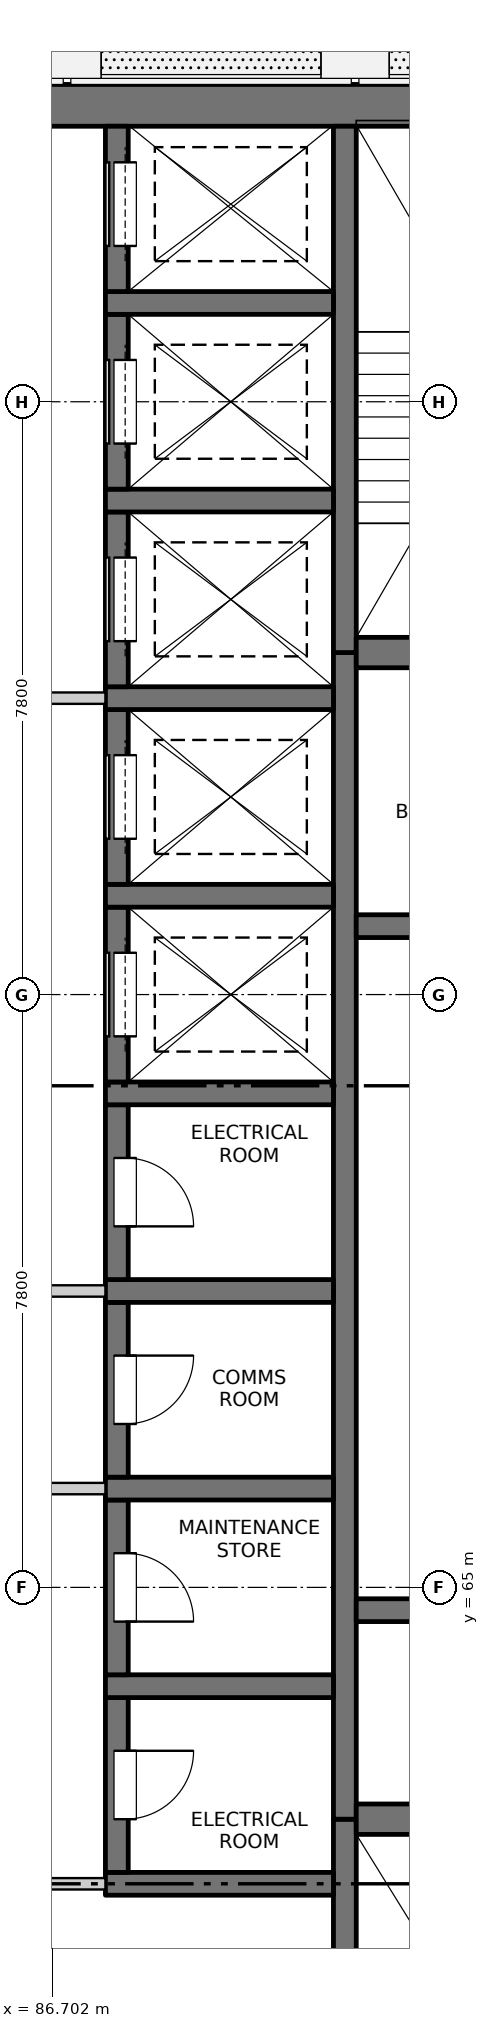
"""IFC4 building model, lengths in metres.
Left out: names, types, materials, properties, quantities, classifications, styles, units other than length and angle.
Written with IfcOpenShell. Run it as: python <this file> out.ifc"""

import sys

from ifc_helpers import new_model, si_unit, direction, frame, frame_2d, origin, place, context, subcontext, project, spatial, rectangle, extrude, element, fill, save


model = new_model("IFC4")
c1 = context("Model", 3, precision=1e-05, world=origin(), true_north=direction((0.0, 1.0)))
c2 = subcontext(c1, "Body", "Model", "MODEL_VIEW")
j1 = project(units=[si_unit("LENGTHUNIT", "METRE"), si_unit("PLANEANGLEUNIT", "RADIAN")], contexts=[c1])
p1 = place(None, origin())
s1 = spatial("IfcSite", under=j1, at=p1, CompositionType="ELEMENT")
p2 = place(p1, origin())
s2 = spatial("IfcBuilding", under=s1, at=p2, CompositionType="ELEMENT")
p3 = place(p2, frame((0.0, 0.0, 189.4)))
s3 = spatial("IfcBuildingStorey", under=s2, at=p3, CompositionType="ELEMENT", Elevation=189.4)
p4 = place(p3, frame((75.525, 84.5, -0.25), z_axis=(0.0, 0.0, 1.0), x_axis=(1.0, 0.0, 0.0)))
e1 = element("IfcWall", 1, at=p4, inside=s3, PredefinedType="SOLIDWALL", context=c2, shape_type="SweptSolid", body=[
    extrude(rectangle(XDim=18.95, YDim=0.55, at=frame_2d((9.475, 0.0))), origin(), (0.0, 0.0, 1.0), 3.35),
])
p5 = place(p3, frame((90.55, 55.525, -0.25), z_axis=(0.0, 0.0, 1.0), x_axis=(0.0, 1.0, 0.0)))
e2 = element("IfcWall", 2, at=p5, inside=s3, PredefinedType="SOLIDWALL", context=c2, shape_type="SweptSolid", body=[
    extrude(rectangle(XDim=6.425, YDim=0.3, at=frame_2d((3.212, 0.0))), origin(), (0.0, 0.0, 1.0), 3.35),
])
p6 = place(p3, frame((90.55, 61.95, -0.25), z_axis=(0.0, 0.0, 1.0), x_axis=(0.0, 1.0, 0.0)))
e3 = element("IfcWall", 3, at=p6, inside=s3, PredefinedType="SOLIDWALL", context=c2, shape_type="SweptSolid", body=[
    extrude(rectangle(XDim=15.35, YDim=0.3, at=frame_2d((7.675, 0.0))), origin(), (0.0, 0.0, 1.0), 3.35),
])
p7 = place(p3, frame((90.55, 77.3, -0.25), z_axis=(0.0, 0.0, 1.0), x_axis=(0.0, 1.0, 0.0)))
e4 = element("IfcWall", 4, at=p7, inside=s3, PredefinedType="SOLIDWALL", context=c2, shape_type="SweptSolid", body=[
    extrude(rectangle(XDim=6.925, YDim=0.3, at=frame_2d((3.462, 0.0))), origin(), (0.0, 0.0, 1.0), 3.35),
])
p8 = place(p3, frame((87.4, 61.1, -0.25), z_axis=(0.0, 0.0, 1.0), x_axis=(1.0, 0.0, 0.0)))
e5 = element("IfcWall", 5, at=p8, inside=s3, PredefinedType="SOLIDWALL", context=c2, shape_type="SweptSolid", body=[
    extrude(rectangle(XDim=3.0, YDim=0.3, at=frame_2d((1.5, 0.0))), origin(), (0.0, 0.0, 1.0), 3.35),
])
p9 = place(p3, frame((87.55, 61.25, -0.25), z_axis=(0.0, 0.0, 1.0), x_axis=(0.0, 1.0, 0.0)))
e6 = element("IfcWall", 6, at=p9, inside=s3, PredefinedType="SOLIDWALL", context=c2, shape_type="SweptSolid", body=[
    extrude(rectangle(XDim=2.3, YDim=0.3, at=frame_2d((1.15, 0.0))), origin(), (0.0, 0.0, 1.0), 3.35),
])
p10 = place(p9, frame((0.7, 0.0, 0.25)))
e7 = element("IfcOpeningElement", 7, at=p10, cuts=e6, PredefinedType="OPENING", context=c2, shape_type="SweptSolid", body=[
    extrude(rectangle(XDim=0.9, YDim=2.1, at=frame_2d((0.45, 1.05))), frame((0.0, 0.16, 0.0), z_axis=(0.0, -1.0, 0.0), x_axis=(1.0, 0.0, 0.0)), (0.0, 0.0, 1.0), 0.32),
])
p11 = place(p3, frame((87.4, 63.7, -0.25), z_axis=(0.0, 0.0, 1.0), x_axis=(1.0, 0.0, 0.0)))
e8 = element("IfcWall", 8, at=p11, inside=s3, PredefinedType="SOLIDWALL", context=c2, shape_type="SweptSolid", body=[
    extrude(rectangle(XDim=3.0, YDim=0.3, at=frame_2d((1.5, 0.0))), origin(), (0.0, 0.0, 1.0), 3.35),
])
p12 = place(p3, frame((87.55, 63.85, -0.25), z_axis=(0.0, 0.0, 1.0), x_axis=(0.0, 1.0, 0.0)))
e9 = element("IfcWall", 9, at=p12, inside=s3, PredefinedType="SOLIDWALL", context=c2, shape_type="SweptSolid", body=[
    extrude(rectangle(XDim=2.3, YDim=0.3, at=frame_2d((1.15, 0.0))), origin(), (0.0, 0.0, 1.0), 3.35),
])
p13 = place(p12, frame((0.7, 0.0, 0.25)))
e10 = element("IfcOpeningElement", 10, at=p13, cuts=e9, PredefinedType="OPENING", context=c2, shape_type="SweptSolid", body=[
    extrude(rectangle(XDim=0.9, YDim=2.1, at=frame_2d((0.45, 1.05))), frame((0.0, 0.16, 0.0), z_axis=(0.0, -1.0, 0.0), x_axis=(1.0, 0.0, 0.0)), (0.0, 0.0, 1.0), 0.32),
])
p14 = place(p3, frame((87.4, 66.3, -0.25), z_axis=(0.0, 0.0, 1.0), x_axis=(1.0, 0.0, 0.0)))
e11 = element("IfcWall", 11, at=p14, inside=s3, PredefinedType="SOLIDWALL", context=c2, shape_type="SweptSolid", body=[
    extrude(rectangle(XDim=3.0, YDim=0.3, at=frame_2d((1.5, 0.0))), origin(), (0.0, 0.0, 1.0), 3.35),
])
p15 = place(p3, frame((87.55, 66.45, -0.25), z_axis=(0.0, 0.0, 1.0), x_axis=(0.0, 1.0, 0.0)))
e12 = element("IfcWall", 12, at=p15, inside=s3, PredefinedType="SOLIDWALL", context=c2, shape_type="SweptSolid", body=[
    extrude(rectangle(XDim=2.3, YDim=0.3, at=frame_2d((1.15, 0.0))), origin(), (0.0, 0.0, 1.0), 3.35),
])
p16 = place(p15, frame((0.7, 0.0, 0.25)))
e13 = element("IfcOpeningElement", 13, at=p16, cuts=e12, PredefinedType="OPENING", context=c2, shape_type="SweptSolid", body=[
    extrude(rectangle(XDim=0.9, YDim=2.1, at=frame_2d((0.45, 1.05))), frame((0.0, 0.16, 0.0), z_axis=(0.0, -1.0, 0.0), x_axis=(1.0, 0.0, 0.0)), (0.0, 0.0, 1.0), 0.32),
])
p17 = place(p3, frame((87.4, 68.9, -0.25), z_axis=(0.0, 0.0, 1.0), x_axis=(1.0, 0.0, 0.0)))
e14 = element("IfcWall", 14, at=p17, inside=s3, PredefinedType="SOLIDWALL", context=c2, shape_type="SweptSolid", body=[
    extrude(rectangle(XDim=3.0, YDim=0.3, at=frame_2d((1.5, 0.0))), origin(), (0.0, 0.0, 1.0), 3.35),
])
p18 = place(p3, frame((87.55, 69.05, -0.25), z_axis=(0.0, 0.0, 1.0), x_axis=(0.0, 1.0, 0.0)))
e15 = element("IfcWall", 15, at=p18, inside=s3, PredefinedType="SOLIDWALL", context=c2, shape_type="SweptSolid", body=[
    extrude(rectangle(XDim=2.3, YDim=0.3, at=frame_2d((1.15, 0.0))), origin(), (0.0, 0.0, 1.0), 3.35),
])
p19 = place(p18, frame((0.7, 0.0, 0.25)))
e16 = element("IfcOpeningElement", 16, at=p19, cuts=e15, PredefinedType="OPENING", context=c2, shape_type="SweptSolid", body=[
    extrude(rectangle(XDim=0.9, YDim=2.1, at=frame_2d((0.45, 1.05))), frame((0.0, 0.16, 0.0), z_axis=(0.0, -1.0, 0.0), x_axis=(1.0, 0.0, 0.0)), (0.0, 0.0, 1.0), 0.32),
])
p20 = place(p3, frame((87.4, 71.5, -0.25), z_axis=(0.0, 0.0, 1.0), x_axis=(1.0, 0.0, 0.0)))
e17 = element("IfcWall", 17, at=p20, inside=s3, PredefinedType="SOLIDWALL", context=c2, shape_type="SweptSolid", body=[
    extrude(rectangle(XDim=3.0, YDim=0.3, at=frame_2d((1.5, 0.0))), origin(), (0.0, 0.0, 1.0), 3.35),
])
p21 = place(p3, frame((87.55, 71.65, -0.25), z_axis=(0.0, 0.0, 1.0), x_axis=(0.0, 1.0, 0.0)))
e18 = element("IfcWall", 18, at=p21, inside=s3, PredefinedType="SOLIDWALL", context=c2, shape_type="SweptSolid", body=[
    extrude(rectangle(XDim=2.3, YDim=0.3, at=frame_2d((1.15, 0.0))), origin(), (0.0, 0.0, 1.0), 3.35),
])
p22 = place(p21, frame((0.6, 0.0, 0.25)))
e19 = element("IfcOpeningElement", 19, at=p22, cuts=e18, PredefinedType="OPENING", context=c2, shape_type="SweptSolid", body=[
    extrude(rectangle(XDim=1.1, YDim=2.1, at=frame_2d((0.55, 1.05))), frame((0.0, 0.16, 0.0), z_axis=(0.0, -1.0, 0.0), x_axis=(1.0, 0.0, 0.0)), (0.0, 0.0, 1.0), 0.32),
])
p23 = place(p3, frame((87.4, 74.1, -0.25), z_axis=(0.0, 0.0, 1.0), x_axis=(1.0, 0.0, 0.0)))
e20 = element("IfcWall", 20, at=p23, inside=s3, PredefinedType="SOLIDWALL", context=c2, shape_type="SweptSolid", body=[
    extrude(rectangle(XDim=3.0, YDim=0.3, at=frame_2d((1.5, 0.0))), origin(), (0.0, 0.0, 1.0), 3.35),
])
p24 = place(p3, frame((87.55, 74.25, -0.25), z_axis=(0.0, 0.0, 1.0), x_axis=(0.0, 1.0, 0.0)))
e21 = element("IfcWall", 21, at=p24, inside=s3, PredefinedType="SOLIDWALL", context=c2, shape_type="SweptSolid", body=[
    extrude(rectangle(XDim=2.3, YDim=0.3, at=frame_2d((1.15, 0.0))), origin(), (0.0, 0.0, 1.0), 3.35),
])
p25 = place(p24, frame((0.6, 0.0, 0.25)))
e22 = element("IfcOpeningElement", 22, at=p25, cuts=e21, PredefinedType="OPENING", context=c2, shape_type="SweptSolid", body=[
    extrude(rectangle(XDim=1.1, YDim=2.1, at=frame_2d((0.55, 1.05))), frame((0.0, 0.16, 0.0), z_axis=(0.0, -1.0, 0.0), x_axis=(1.0, 0.0, 0.0)), (0.0, 0.0, 1.0), 0.32),
])
p26 = place(p3, frame((87.4, 76.7, -0.25), z_axis=(0.0, 0.0, 1.0), x_axis=(1.0, 0.0, 0.0)))
e23 = element("IfcWall", 23, at=p26, inside=s3, PredefinedType="SOLIDWALL", context=c2, shape_type="SweptSolid", body=[
    extrude(rectangle(XDim=3.0, YDim=0.3, at=frame_2d((1.5, 0.0))), origin(), (0.0, 0.0, 1.0), 3.35),
])
p27 = place(p3, frame((87.55, 76.85, -0.25), z_axis=(0.0, 0.0, 1.0), x_axis=(0.0, 1.0, 0.0)))
e24 = element("IfcWall", 24, at=p27, inside=s3, PredefinedType="SOLIDWALL", context=c2, shape_type="SweptSolid", body=[
    extrude(rectangle(XDim=2.3, YDim=0.3, at=frame_2d((1.15, 0.0))), origin(), (0.0, 0.0, 1.0), 3.35),
])
p28 = place(p27, frame((0.6, 0.0, 0.25)))
e25 = element("IfcOpeningElement", 25, at=p28, cuts=e24, PredefinedType="OPENING", context=c2, shape_type="SweptSolid", body=[
    extrude(rectangle(XDim=1.1, YDim=2.1, at=frame_2d((0.55, 1.05))), frame((0.0, 0.16, 0.0), z_axis=(0.0, -1.0, 0.0), x_axis=(1.0, 0.0, 0.0)), (0.0, 0.0, 1.0), 0.32),
])
p29 = place(p3, frame((87.4, 79.3, -0.25), z_axis=(0.0, 0.0, 1.0), x_axis=(1.0, 0.0, 0.0)))
e26 = element("IfcWall", 26, at=p29, inside=s3, PredefinedType="SOLIDWALL", context=c2, shape_type="SweptSolid", body=[
    extrude(rectangle(XDim=3.0, YDim=0.3, at=frame_2d((1.5, 0.0))), origin(), (0.0, 0.0, 1.0), 3.35),
])
p30 = place(p3, frame((87.55, 79.45, -0.25), z_axis=(0.0, 0.0, 1.0), x_axis=(0.0, 1.0, 0.0)))
e27 = element("IfcWall", 27, at=p30, inside=s3, PredefinedType="SOLIDWALL", context=c2, shape_type="SweptSolid", body=[
    extrude(rectangle(XDim=2.3, YDim=0.3, at=frame_2d((1.15, 0.0))), origin(), (0.0, 0.0, 1.0), 3.35),
])
p31 = place(p30, frame((0.6, 0.0, 0.25)))
e28 = element("IfcOpeningElement", 28, at=p31, cuts=e27, PredefinedType="OPENING", context=c2, shape_type="SweptSolid", body=[
    extrude(rectangle(XDim=1.1, YDim=2.1, at=frame_2d((0.55, 1.05))), frame((0.0, 0.16, 0.0), z_axis=(0.0, -1.0, 0.0), x_axis=(1.0, 0.0, 0.0)), (0.0, 0.0, 1.0), 0.32),
])
p32 = place(p3, frame((87.4, 81.9, -0.25), z_axis=(0.0, 0.0, 1.0), x_axis=(1.0, 0.0, 0.0)))
e29 = element("IfcWall", 29, at=p32, inside=s3, PredefinedType="SOLIDWALL", context=c2, shape_type="SweptSolid", body=[
    extrude(rectangle(XDim=3.0, YDim=0.3, at=frame_2d((1.5, 0.0))), origin(), (0.0, 0.0, 1.0), 3.35),
])
p33 = place(p3, frame((87.55, 82.05, -0.25), z_axis=(0.0, 0.0, 1.0), x_axis=(0.0, 1.0, 0.0)))
e30 = element("IfcWall", 30, at=p33, inside=s3, PredefinedType="SOLIDWALL", context=c2, shape_type="SweptSolid", body=[
    extrude(rectangle(XDim=2.175, YDim=0.3, at=frame_2d((1.087, 0.0))), origin(), (0.0, 0.0, 1.0), 3.35),
])
p34 = place(p33, frame((0.6, 0.0, 0.25)))
e31 = element("IfcOpeningElement", 31, at=p34, cuts=e30, PredefinedType="OPENING", context=c2, shape_type="SweptSolid", body=[
    extrude(rectangle(XDim=1.1, YDim=2.1, at=frame_2d((0.55, 1.05))), frame((0.0, 0.16, 0.0), z_axis=(0.0, -1.0, 0.0), x_axis=(1.0, 0.0, 0.0)), (0.0, 0.0, 1.0), 0.32),
])
p35 = place(p3, frame((90.7, 61.95, -0.25), z_axis=(0.0, 0.0, 1.0), x_axis=(1.0, 0.0, 0.0)))
e32 = element("IfcWall", 32, at=p35, inside=s3, PredefinedType="SOLIDWALL", context=c2, shape_type="SweptSolid", body=[
    extrude(rectangle(XDim=3.775, YDim=0.4, at=frame_2d((1.888, 0.0))), origin(), (0.0, 0.0, 1.0), 3.35),
])
for number, where, z_axis, x_axis in (
    (33, (90.7, 64.7, -0.25), (0.0, 0.0, 1.0), (1.0, 0.0, 0.0)),
    (34, (90.7, 73.7, -0.25), (0.0, 0.0, 1.0), (1.0, 0.0, 0.0)),
):
    element("IfcWall", number, at=place(p3, frame(where, z_axis=z_axis, x_axis=x_axis)), inside=s3, PredefinedType="SOLIDWALL", context=c2, shape_type="SweptSolid", body=[
        extrude(rectangle(XDim=3.775, YDim=0.3, at=frame_2d((1.888, 0.0))), origin(), (0.0, 0.0, 1.0), 3.35),
    ])
p36 = place(p3, frame((90.7, 77.3, -0.25), z_axis=(0.0, 0.0, 1.0), x_axis=(1.0, 0.0, 0.0)))
e35 = element("IfcWall", 35, at=p36, inside=s3, PredefinedType="SOLIDWALL", context=c2, shape_type="SweptSolid", body=[
    extrude(rectangle(XDim=3.775, YDim=0.4, at=frame_2d((1.888, 0.0))), origin(), (0.0, 0.0, 1.0), 3.35),
])
p37 = place(p3, frame((82.6, 61.1, 0.0), z_axis=(0.0, 0.0, 1.0), x_axis=(1.0, 0.0, 0.0)))
e36 = element("IfcWall", 36, at=p37, inside=s3, PredefinedType="PARTITIONING", context=c2, shape_type="SweptSolid", body=[
    extrude(rectangle(XDim=4.8, YDim=0.15, at=frame_2d((2.4, 0.0))), origin(), (0.0, 0.0, 1.0), 3.1),
])
p38 = place(p37, frame((1.5, 0.0, 0.0)))
e37 = element("IfcOpeningElement", 37, at=p38, cuts=e36, PredefinedType="OPENING", context=c2, shape_type="SweptSolid", body=[
    extrude(rectangle(XDim=1.8, YDim=2.1, at=frame_2d((0.9, 1.05))), frame((0.0, 0.085, 0.0), z_axis=(0.0, -1.0, 0.0), x_axis=(1.0, 0.0, 0.0)), (0.0, 0.0, 1.0), 0.17),
])
p39 = place(p3, frame((82.6, 66.3, 0.0), z_axis=(0.0, 0.0, 1.0), x_axis=(1.0, 0.0, 0.0)))
e38 = element("IfcWall", 38, at=p39, inside=s3, PredefinedType="PARTITIONING", context=c2, shape_type="SweptSolid", body=[
    extrude(rectangle(XDim=4.8, YDim=0.15, at=frame_2d((2.4, 0.0))), origin(), (0.0, 0.0, 1.0), 3.1),
])
p40 = place(p39, frame((1.5, 0.0, 0.0)))
e39 = element("IfcOpeningElement", 39, at=p40, cuts=e38, PredefinedType="OPENING", context=c2, shape_type="SweptSolid", body=[
    extrude(rectangle(XDim=1.8, YDim=2.1, at=frame_2d((0.9, 1.05))), frame((0.0, 0.085, 0.0), z_axis=(0.0, -1.0, 0.0), x_axis=(1.0, 0.0, 0.0)), (0.0, 0.0, 1.0), 0.17),
])
p41 = place(p3, frame((82.6, 68.9, 0.0), z_axis=(0.0, 0.0, 1.0), x_axis=(1.0, 0.0, 0.0)))
e40 = element("IfcWall", 40, at=p41, inside=s3, PredefinedType="PARTITIONING", context=c2, shape_type="SweptSolid", body=[
    extrude(rectangle(XDim=4.8, YDim=0.15, at=frame_2d((2.4, 0.0))), origin(), (0.0, 0.0, 1.0), 3.1),
])
p42 = place(p41, frame((1.5, 0.0, 0.0)))
e41 = element("IfcOpeningElement", 41, at=p42, cuts=e40, PredefinedType="OPENING", context=c2, shape_type="SweptSolid", body=[
    extrude(rectangle(XDim=1.8, YDim=2.1, at=frame_2d((0.9, 1.05))), frame((0.0, 0.085, 0.0), z_axis=(0.0, -1.0, 0.0), x_axis=(1.0, 0.0, 0.0)), (0.0, 0.0, 1.0), 0.17),
])
p43 = place(p3, frame((82.6, 76.7, 0.0), z_axis=(0.0, 0.0, 1.0), x_axis=(1.0, 0.0, 0.0)))
e42 = element("IfcWall", 42, at=p43, inside=s3, PredefinedType="PARTITIONING", context=c2, shape_type="SweptSolid", body=[
    extrude(rectangle(XDim=4.8, YDim=0.15, at=frame_2d((2.4, 0.0))), origin(), (0.0, 0.0, 1.0), 3.1),
])
p44 = place(p43, frame((1.5, 0.0, 0.0)))
e43 = element("IfcOpeningElement", 43, at=p44, cuts=e42, PredefinedType="OPENING", context=c2, shape_type="SweptSolid", body=[
    extrude(rectangle(XDim=1.8, YDim=2.1, at=frame_2d((0.9, 1.05))), frame((0.0, 0.085, 0.0), z_axis=(0.0, -1.0, 0.0), x_axis=(1.0, 0.0, 0.0)), (0.0, 0.0, 1.0), 0.17),
])
p45 = place(p10, origin())
e44 = element("IfcDoor", 44, at=p45, inside=s3, OperationType="SINGLE_SWING_LEFT", PredefinedType="DOOR", context=c2, shape_type="SweptSolid", body=[
    extrude(rectangle(XDim=0.9, YDim=2.1, at=frame_2d((0.45, 1.05))), frame((0.0, -0.085, 0.0), z_axis=(0.0, -1.0, 0.0), x_axis=(1.0, 0.0, 0.0)), (0.0, 0.0, 1.0), 0.05),
])
fill(e7, e44)
p46 = place(p13, origin())
e45 = element("IfcDoor", 45, at=p46, inside=s3, OperationType="SINGLE_SWING_RIGHT", PredefinedType="DOOR", context=c2, shape_type="SweptSolid", body=[
    extrude(rectangle(XDim=0.9, YDim=2.1, at=frame_2d((0.45, 1.05))), frame((0.0, -0.085, 0.0), z_axis=(0.0, -1.0, 0.0), x_axis=(1.0, 0.0, 0.0)), (0.0, 0.0, 1.0), 0.05),
])
fill(e10, e45)
p47 = place(p16, origin())
e46 = element("IfcDoor", 46, at=p47, inside=s3, OperationType="SINGLE_SWING_LEFT", PredefinedType="DOOR", context=c2, shape_type="SweptSolid", body=[
    extrude(rectangle(XDim=0.9, YDim=2.1, at=frame_2d((0.45, 1.05))), frame((0.0, -0.085, 0.0), z_axis=(0.0, -1.0, 0.0), x_axis=(1.0, 0.0, 0.0)), (0.0, 0.0, 1.0), 0.05),
])
fill(e13, e46)
p48 = place(p19, origin())
e47 = element("IfcDoor", 47, at=p48, inside=s3, OperationType="SINGLE_SWING_RIGHT", PredefinedType="DOOR", context=c2, shape_type="SweptSolid", body=[
    extrude(rectangle(XDim=0.9, YDim=2.1, at=frame_2d((0.45, 1.05))), frame((0.0, -0.085, 0.0), z_axis=(0.0, -1.0, 0.0), x_axis=(1.0, 0.0, 0.0)), (0.0, 0.0, 1.0), 0.05),
])
fill(e16, e47)
p49 = place(p22, origin())
e48 = element("IfcDoor", 48, at=p49, inside=s3, OperationType="SLIDING_TO_LEFT", PredefinedType="DOOR", context=c2, shape_type="SweptSolid", body=[
    extrude(rectangle(XDim=1.1, YDim=2.1, at=frame_2d((0.55, 1.05))), frame((0.0, -0.085, 0.0), z_axis=(0.0, -1.0, 0.0), x_axis=(1.0, 0.0, 0.0)), (0.0, 0.0, 1.0), 0.05),
])
fill(e19, e48)
p50 = place(p25, origin())
e49 = element("IfcDoor", 49, at=p50, inside=s3, OperationType="SLIDING_TO_LEFT", PredefinedType="DOOR", context=c2, shape_type="SweptSolid", body=[
    extrude(rectangle(XDim=1.1, YDim=2.1, at=frame_2d((0.55, 1.05))), frame((0.0, -0.085, 0.0), z_axis=(0.0, -1.0, 0.0), x_axis=(1.0, 0.0, 0.0)), (0.0, 0.0, 1.0), 0.05),
])
fill(e22, e49)
p51 = place(p28, origin())
e50 = element("IfcDoor", 50, at=p51, inside=s3, OperationType="SLIDING_TO_LEFT", PredefinedType="DOOR", context=c2, shape_type="SweptSolid", body=[
    extrude(rectangle(XDim=1.1, YDim=2.1, at=frame_2d((0.55, 1.05))), frame((0.0, -0.085, 0.0), z_axis=(0.0, -1.0, 0.0), x_axis=(1.0, 0.0, 0.0)), (0.0, 0.0, 1.0), 0.05),
])
fill(e25, e50)
p52 = place(p31, origin())
e51 = element("IfcDoor", 51, at=p52, inside=s3, OperationType="SLIDING_TO_RIGHT", PredefinedType="DOOR", context=c2, shape_type="SweptSolid", body=[
    extrude(rectangle(XDim=1.1, YDim=2.1, at=frame_2d((0.55, 1.05))), frame((0.0, -0.085, 0.0), z_axis=(0.0, -1.0, 0.0), x_axis=(1.0, 0.0, 0.0)), (0.0, 0.0, 1.0), 0.05),
])
fill(e28, e51)
p53 = place(p34, origin())
e52 = element("IfcDoor", 52, at=p53, inside=s3, OperationType="SLIDING_TO_RIGHT", PredefinedType="DOOR", context=c2, shape_type="SweptSolid", body=[
    extrude(rectangle(XDim=1.1, YDim=2.1, at=frame_2d((0.55, 1.05))), frame((0.0, -0.085, 0.0), z_axis=(0.0, -1.0, 0.0), x_axis=(1.0, 0.0, 0.0)), (0.0, 0.0, 1.0), 0.05),
])
fill(e31, e52)
save(model, sys.argv[1])
